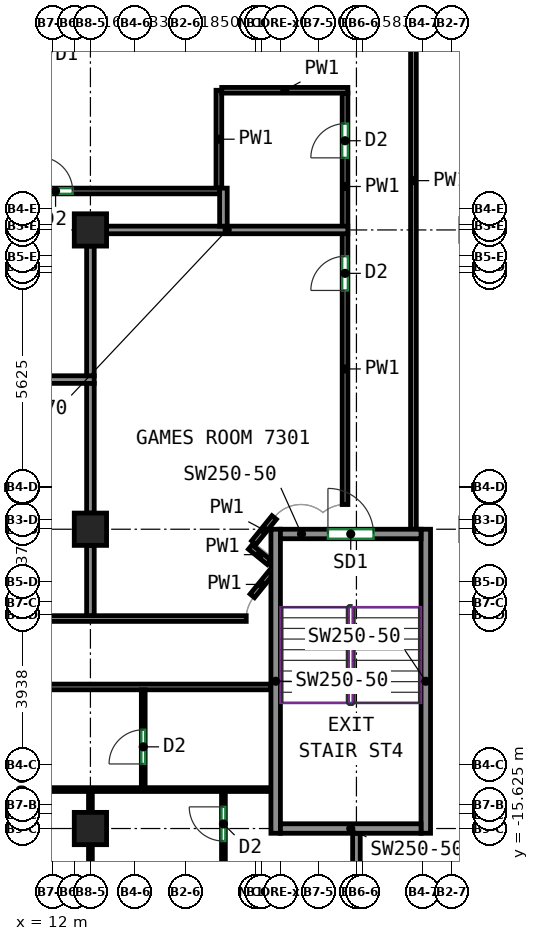
"""IFC4 building model, lengths in metres.
Left out: names, types, materials, properties, quantities, classifications, styles, units other than length and angle.
Written with IfcOpenShell. Run it as: python <this file> out.ifc"""

import sys

from ifc_helpers import new_model, si_unit, direction, frame, frame_2d, origin, origin_2d, place, context, subcontext, project, spatial, rectangle, extrude, source, transform, mapped, element, fill, save


model = new_model("IFC4")
c1 = context("Model", 3, precision=1e-05, world=origin(), true_north=direction((0.0, 1.0)))
c2 = subcontext(c1, "Body", "Model", "MODEL_VIEW")
j1 = project(units=[si_unit("LENGTHUNIT", "METRE"), si_unit("PLANEANGLEUNIT", "RADIAN")], contexts=[c1])
p1 = place(None, origin())
s1 = spatial("IfcSite", under=j1, at=p1, CompositionType="ELEMENT")
p2 = place(p1, origin())
s2 = spatial("IfcBuilding", under=s1, at=p2, CompositionType="ELEMENT")
p3 = place(p2, frame((0.0, 0.0, 295.0)))
s3 = spatial("IfcBuildingStorey", under=s2, at=p3, CompositionType="ELEMENT", Elevation=295.0)
m1 = source(origin(), c2, "Body", "SweptSolid", [
    extrude(rectangle(XDim=0.85, YDim=0.85, at=origin_2d()), origin(), (0.0, 0.0, 1.0), 3.12),
])
for number, where, z_axis, x_axis in (
    (1, (13.0, -15.625, 0.0), (0.0, 0.0, 1.0), (1.0, 0.0, 0.0)),
    (2, (13.0, -7.75, 0.0), (0.0, 0.0, 1.0), (1.0, 0.0, 0.0)),
    (3, (13.0, 0.125, 0.0), (0.0, 0.0, 1.0), (1.0, 0.0, 0.0)),
):
    element("IfcColumn", number, at=place(p3, frame(where, z_axis=z_axis, x_axis=x_axis)), inside=s3, PredefinedType="COLUMN", context=c2, shape_type="MappedRepresentation", body=[
        mapped(m1, transform((0.0, 0.0, 0.0))),
    ])
m2 = source(origin(), c2, "Body", "SweptSolid", [
    extrude(rectangle(XDim=8.0, YDim=0.25, at=frame_2d((4.0, 0.0))), origin(), (0.0, 0.0, 1.0), 3.12),
])
for number, where, z_axis, x_axis in (
    (4, (17.875, -15.75, 0.0), (0.0, 0.0, 1.0), (0.0, 1.0, 0.0)),
    (5, (21.825, -15.75, 0.0), (0.0, 0.0, 1.0), (0.0, 1.0, 0.0)),
):
    element("IfcWall", number, at=place(p3, frame(where, z_axis=z_axis, x_axis=x_axis)), inside=s3, PredefinedType="SHEAR", context=c2, shape_type="MappedRepresentation", body=[
        mapped(m2, transform((0.0, 0.0, 0.0))),
    ])
m3 = source(origin(), c2, "Body", "SweptSolid", [
    extrude(rectangle(XDim=3.7, YDim=0.25, at=frame_2d((1.85, 0.0))), origin(), (0.0, 0.0, 1.0), 3.12),
])
p4 = place(p3, frame((18.0, -15.625, 0.0), z_axis=(0.0, 0.0, 1.0), x_axis=(1.0, 0.0, 0.0)))
e6 = element("IfcWall", 6, at=p4, inside=s3, PredefinedType="SHEAR", context=c2, shape_type="MappedRepresentation", body=[
    mapped(m3, transform((0.0, 0.0, 0.0))),
])
p5 = place(p3, frame((18.0, -7.875, 0.0), z_axis=(0.0, 0.0, 1.0), x_axis=(1.0, 0.0, 0.0)))
e7 = element("IfcWall", 7, at=p5, inside=s3, PredefinedType="SHEAR", context=c2, shape_type="MappedRepresentation", body=[
    mapped(m3, transform((0.0, 0.0, 0.0))),
])
p6 = place(p5, frame((1.25, 0.0, 0.0)))
e8 = element("IfcOpeningElement", 8, at=p6, cuts=e7, PredefinedType="OPENING", context=c2, shape_type="SweptSolid", body=[
    extrude(rectangle(XDim=1.2, YDim=2.1, at=frame_2d((0.6, 1.05))), frame((0.0, 0.135, 0.0), z_axis=(0.0, -1.0, 0.0), x_axis=(1.0, 0.0, 0.0)), (0.0, 0.0, 1.0), 0.27),
])
p7 = place(p3, frame((-13.55, -11.9, 0.0), z_axis=(0.0, 0.0, 1.0), x_axis=(1.0, 0.0, 0.0)))
e9 = element("IfcWall", 9, at=p7, inside=s3, PredefinedType="PARTITIONING", context=c2, shape_type="SweptSolid", body=[
    extrude(rectangle(XDim=31.3, YDim=0.15, at=frame_2d((15.65, 0.0))), origin(), (0.0, 0.0, 1.0), 3.12),
])
p8 = place(p7, frame((3.747, 0.0, 0.0)))
e10 = element("IfcOpeningElement", 10, at=p8, cuts=e9, PredefinedType="OPENING", context=c2, shape_type="SweptSolid", body=[
    extrude(rectangle(XDim=1.0, YDim=2.1, at=frame_2d((0.5, 1.05))), frame((0.0, 0.085, 0.0), z_axis=(0.0, -1.0, 0.0), x_axis=(1.0, 0.0, 0.0)), (0.0, 0.0, 1.0), 0.17),
])
p9 = place(p7, frame((22.835, 0.0, 0.0)))
e11 = element("IfcOpeningElement", 11, at=p9, cuts=e9, PredefinedType="OPENING", context=c2, shape_type="SweptSolid", body=[
    extrude(rectangle(XDim=1.0, YDim=2.1, at=frame_2d((0.5, 1.05))), frame((0.0, 0.085, 0.0), z_axis=(0.0, -1.0, 0.0), x_axis=(1.0, 0.0, 0.0)), (0.0, 0.0, 1.0), 0.17),
])
p10 = place(p3, frame((21.5, -7.75, 0.0), z_axis=(0.0, 0.0, 1.0), x_axis=(0.0, 1.0, 0.0)))
e12 = element("IfcWall", 12, at=p10, inside=s3, PredefinedType="PARTITIONING", context=c2, shape_type="SweptSolid", body=[
    extrude(rectangle(XDim=30.575, YDim=0.15, at=frame_2d((15.288, 0.0))), origin(), (0.0, 0.0, 1.0), 3.12),
])
p11 = place(p10, frame((14.035, 0.0, 0.0)))
e13 = element("IfcOpeningElement", 13, at=p11, cuts=e12, PredefinedType="OPENING", context=c2, shape_type="SweptSolid", body=[
    extrude(rectangle(XDim=0.9, YDim=2.1, at=frame_2d((0.45, 1.05))), frame((0.0, 0.085, 0.0), z_axis=(0.0, -1.0, 0.0), x_axis=(1.0, 0.0, 0.0)), (0.0, 0.0, 1.0), 0.17),
])
p12 = place(p3, frame((-13.55, -10.1, 0.0), z_axis=(0.0, 0.0, 1.0), x_axis=(1.0, 0.0, 0.0)))
e14 = element("IfcWall", 14, at=p12, inside=s3, PredefinedType="PARTITIONING", context=c2, shape_type="SweptSolid", body=[
    extrude(rectangle(XDim=30.65, YDim=0.15, at=frame_2d((15.325, 0.0))), origin(), (0.0, 0.0, 1.0), 3.12),
])
p13 = place(p12, frame((10.25, 0.0, 0.0)))
e15 = element("IfcOpeningElement", 15, at=p13, cuts=e14, PredefinedType="OPENING", context=c2, shape_type="SweptSolid", body=[
    extrude(rectangle(XDim=0.9, YDim=2.1, at=frame_2d((0.45, 1.05))), frame((0.0, 0.085, 0.0), z_axis=(0.0, -1.0, 0.0), x_axis=(1.0, 0.0, 0.0)), (0.0, 0.0, 1.0), 0.17),
])
p14 = place(p12, frame((22.153, 0.0, 0.0)))
e16 = element("IfcOpeningElement", 16, at=p14, cuts=e14, PredefinedType="OPENING", context=c2, shape_type="SweptSolid", body=[
    extrude(rectangle(XDim=0.9, YDim=2.1, at=frame_2d((0.45, 1.05))), frame((0.0, 0.085, 0.0), z_axis=(0.0, -1.0, 0.0), x_axis=(1.0, 0.0, 0.0)), (0.0, 0.0, 1.0), 0.17),
])
p15 = place(p3, frame((16.38, 1.225, 0.0), z_axis=(0.0, 0.0, 1.0), x_axis=(0.0, 1.0, 0.0)))
e17 = element("IfcWall", 17, at=p15, inside=s3, PredefinedType="PARTITIONING", context=c2, shape_type="SweptSolid", body=[
    extrude(rectangle(XDim=2.575, YDim=0.15, at=frame_2d((1.288, 0.0))), origin(), (0.0, 0.0, 1.0), 3.12),
])
p16 = place(p3, frame((6.805, 1.15, 0.0), z_axis=(0.0, 0.0, 1.0), x_axis=(1.0, 0.0, 0.0)))
e18 = element("IfcWall", 18, at=p16, inside=s3, PredefinedType="PARTITIONING", context=c2, shape_type="SweptSolid", body=[
    extrude(rectangle(XDim=9.595, YDim=0.15, at=frame_2d((4.797, 0.0))), origin(), (0.0, 0.0, 1.0), 3.12),
])
p17 = place(p16, frame((4.828, 0.0, 0.0)))
e19 = element("IfcOpeningElement", 19, at=p17, cuts=e18, PredefinedType="OPENING", context=c2, shape_type="SweptSolid", body=[
    extrude(rectangle(XDim=0.9, YDim=2.1, at=frame_2d((0.45, 1.05))), frame((0.0, 0.085, 0.0), z_axis=(0.0, -1.0, 0.0), x_axis=(1.0, 0.0, 0.0)), (0.0, 0.0, 1.0), 0.17),
])
p18 = place(p3, frame((17.748, -8.902, 0.0), z_axis=(0.0, 0.0, 1.0), x_axis=(-0.630342797145, -0.776316918589, 0.0)))
e20 = element("IfcWall", 20, at=p18, inside=s3, PredefinedType="PARTITIONING", context=c2, shape_type="SweptSolid", body=[
    extrude(rectangle(XDim=0.773, YDim=0.15, at=frame_2d((0.386, 0.0))), origin(), (0.0, 0.0, 1.0), 3.12),
])
p19 = place(p3, frame((17.206, -8.218, 0.0), z_axis=(0.0, 0.0, 1.0), x_axis=(0.776102288291, -0.630607039376, 0.0)))
e21 = element("IfcWall", 21, at=p19, inside=s3, PredefinedType="PARTITIONING", context=c2, shape_type="SweptSolid", body=[
    extrude(rectangle(XDim=0.638, YDim=0.15, at=frame_2d((0.319, 0.0))), origin(), (0.0, 0.0, 1.0), 3.12),
])
p20 = place(p3, frame((17.835, -7.442, 0.0), z_axis=(0.0, 0.0, 1.0), x_axis=(-0.628859024249, -0.777519342281, 0.0)))
e22 = element("IfcWall", 22, at=p20, inside=s3, PredefinedType="PARTITIONING", context=c2, shape_type="SweptSolid", body=[
    extrude(rectangle(XDim=0.849, YDim=0.15, at=frame_2d((0.425, 0.0))), origin(), (0.0, 0.0, 1.0), 3.12),
])
p21 = place(p3, frame((19.7, -7.1, 0.0), z_axis=(0.0, 0.0, 1.0), x_axis=(0.0, 1.0, 0.0)))
e23 = element("IfcWall", 23, at=p21, inside=s3, PredefinedType="PARTITIONING", context=c2, shape_type="SweptSolid", body=[
    extrude(rectangle(XDim=7.135, YDim=0.15, at=frame_2d((3.567, 0.0))), origin(), (0.0, 0.0, 1.0), 3.12),
])
p22 = place(p21, frame((5.633, 0.0, 0.0)))
e24 = element("IfcOpeningElement", 24, at=p22, cuts=e23, PredefinedType="OPENING", context=c2, shape_type="SweptSolid", body=[
    extrude(rectangle(XDim=0.9, YDim=2.1, at=frame_2d((0.45, 1.05))), frame((0.0, 0.085, 0.0), z_axis=(0.0, -1.0, 0.0), x_axis=(1.0, 0.0, 0.0)), (0.0, 0.0, 1.0), 0.17),
])
p23 = place(p3, frame((19.7, 0.215, 0.0), z_axis=(0.0, 0.0, 1.0), x_axis=(0.0, 1.0, 0.0)))
e25 = element("IfcWall", 25, at=p23, inside=s3, PredefinedType="PARTITIONING", context=c2, shape_type="SweptSolid", body=[
    extrude(rectangle(XDim=3.51, YDim=0.15, at=frame_2d((1.755, 0.0))), origin(), (0.0, 0.0, 1.0), 3.12),
])
p24 = place(p23, frame((1.807, 0.0, 0.0)))
e26 = element("IfcOpeningElement", 26, at=p24, cuts=e25, PredefinedType="OPENING", context=c2, shape_type="SweptSolid", body=[
    extrude(rectangle(XDim=0.9, YDim=2.1, at=frame_2d((0.45, 1.05))), frame((0.0, 0.085, 0.0), z_axis=(0.0, -1.0, 0.0), x_axis=(1.0, 0.0, 0.0)), (0.0, 0.0, 1.0), 0.17),
])
p25 = place(p3, frame((16.455, 3.8, 0.0), z_axis=(0.0, 0.0, 1.0), x_axis=(1.0, 0.0, 0.0)))
e27 = element("IfcWall", 27, at=p25, inside=s3, PredefinedType="PARTITIONING", context=c2, shape_type="SweptSolid", body=[
    extrude(rectangle(XDim=3.32, YDim=0.15, at=frame_2d((1.66, 0.0))), origin(), (0.0, 0.0, 1.0), 3.12),
])
p26 = place(p3, frame((-13.55, -14.6, 0.0), z_axis=(0.0, 0.0, 1.0), x_axis=(1.0, 0.0, 0.0)))
e28 = element("IfcWall", 28, at=p26, inside=s3, PredefinedType="PARTITIONING", context=c2, shape_type="SweptSolid", body=[
    extrude(rectangle(XDim=31.3, YDim=0.1, at=frame_2d((15.65, 0.0))), origin(), (0.0, 0.0, 1.0), 3.12),
])
p27 = place(p26, frame((0.309, 0.0, 0.0)))
e29 = element("IfcOpeningElement", 29, at=p27, cuts=e28, PredefinedType="OPENING", context=c2, shape_type="SweptSolid", body=[
    extrude(rectangle(XDim=0.9, YDim=2.1, at=frame_2d((0.45, 1.05))), frame((0.0, 0.06, 0.0), z_axis=(0.0, -1.0, 0.0), x_axis=(1.0, 0.0, 0.0)), (0.0, 0.0, 1.0), 0.12),
])
p28 = place(p26, frame((4.103, 0.0, 0.0)))
e30 = element("IfcOpeningElement", 30, at=p28, cuts=e28, PredefinedType="OPENING", context=c2, shape_type="SweptSolid", body=[
    extrude(rectangle(XDim=1.0, YDim=2.1, at=frame_2d((0.5, 1.05))), frame((0.0, 0.06, 0.0), z_axis=(0.0, -1.0, 0.0), x_axis=(1.0, 0.0, 0.0)), (0.0, 0.0, 1.0), 0.12),
])
p29 = place(p26, frame((13.955, 0.0, 0.0)))
e31 = element("IfcOpeningElement", 31, at=p29, cuts=e28, PredefinedType="OPENING", context=c2, shape_type="SweptSolid", body=[
    extrude(rectangle(XDim=0.9, YDim=2.1, at=frame_2d((0.45, 1.05))), frame((0.0, 0.06, 0.0), z_axis=(0.0, -1.0, 0.0), x_axis=(1.0, 0.0, 0.0)), (0.0, 0.0, 1.0), 0.12),
])
p30 = place(p26, frame((17.453, 0.0, 0.0)))
e32 = element("IfcOpeningElement", 32, at=p30, cuts=e28, PredefinedType="OPENING", context=c2, shape_type="SweptSolid", body=[
    extrude(rectangle(XDim=1.0, YDim=2.1, at=frame_2d((0.5, 1.05))), frame((0.0, 0.06, 0.0), z_axis=(0.0, -1.0, 0.0), x_axis=(1.0, 0.0, 0.0)), (0.0, 0.0, 1.0), 0.12),
])
p31 = place(p26, frame((23.13, 0.0, 0.0)))
e33 = element("IfcOpeningElement", 33, at=p31, cuts=e28, PredefinedType="OPENING", context=c2, shape_type="SweptSolid", body=[
    extrude(rectangle(XDim=1.0, YDim=2.1, at=frame_2d((0.5, 1.05))), frame((0.0, 0.06, 0.0), z_axis=(0.0, -1.0, 0.0), x_axis=(1.0, 0.0, 0.0)), (0.0, 0.0, 1.0), 0.12),
])
p32 = place(p3, frame((14.39, -14.55, 0.0), z_axis=(0.0, 0.0, 1.0), x_axis=(0.0, 1.0, 0.0)))
e34 = element("IfcWall", 34, at=p32, inside=s3, PredefinedType="PARTITIONING", context=c2, shape_type="SweptSolid", body=[
    extrude(rectangle(XDim=2.573, YDim=0.1, at=frame_2d((1.287, 0.0))), origin(), (0.0, 0.0, 1.0), 3.12),
])
p33 = place(p32, frame((0.624, 0.0, 0.0)))
e35 = element("IfcOpeningElement", 35, at=p33, cuts=e34, PredefinedType="OPENING", context=c2, shape_type="SweptSolid", body=[
    extrude(rectangle(XDim=0.9, YDim=2.1, at=frame_2d((0.45, 1.05))), frame((0.0, 0.06, 0.0), z_axis=(0.0, -1.0, 0.0), x_axis=(1.0, 0.0, 0.0)), (0.0, 0.0, 1.0), 0.12),
])
p34 = place(p3, frame((13.0, -15.2, 0.0), z_axis=(0.0, 0.0, 1.0), x_axis=(0.0, 1.0, 0.0)))
e36 = element("IfcWall", 36, at=p34, inside=s3, PredefinedType="PARTITIONING", context=c2, shape_type="SweptSolid", body=[
    extrude(rectangle(XDim=0.548, YDim=0.1, at=frame_2d((0.274, 0.0))), origin(), (0.0, 0.0, 1.0), 3.12),
])
p35 = place(p3, frame((13.0, -22.75, 0.0), z_axis=(0.0, 0.0, 1.0), x_axis=(0.0, 1.0, 0.0)))
e37 = element("IfcWall", 37, at=p35, inside=s3, PredefinedType="PARTITIONING", context=c2, shape_type="SweptSolid", body=[
    extrude(rectangle(XDim=6.7, YDim=0.1, at=frame_2d((3.35, 0.0))), origin(), (0.0, 0.0, 1.0), 3.12),
])
p36 = place(p35, frame((4.377, 0.0, 0.0)))
e38 = element("IfcOpeningElement", 38, at=p36, cuts=e37, PredefinedType="OPENING", context=c2, shape_type="SweptSolid", body=[
    extrude(rectangle(XDim=0.9, YDim=2.1, at=frame_2d((0.45, 1.05))), frame((0.0, 0.06, 0.0), z_axis=(0.0, -1.0, 0.0), x_axis=(1.0, 0.0, 0.0)), (0.0, 0.0, 1.0), 0.12),
])
p37 = place(p3, frame((16.5, -19.91, 0.0), z_axis=(0.0, 0.0, 1.0), x_axis=(0.0, 1.0, 0.0)))
e39 = element("IfcWall", 39, at=p37, inside=s3, PredefinedType="PARTITIONING", context=c2, shape_type="SweptSolid", body=[
    extrude(rectangle(XDim=5.258, YDim=0.1, at=frame_2d((2.629, 0.0))), origin(), (0.0, 0.0, 1.0), 3.12),
])
p38 = place(p37, frame((3.955, 0.0, 0.0)))
e40 = element("IfcOpeningElement", 40, at=p38, cuts=e39, PredefinedType="OPENING", context=c2, shape_type="SweptSolid", body=[
    extrude(rectangle(XDim=0.9, YDim=2.1, at=frame_2d((0.45, 1.05))), frame((0.0, 0.06, 0.0), z_axis=(0.0, -1.0, 0.0), x_axis=(1.0, 0.0, 0.0)), (0.0, 0.0, 1.0), 0.12),
])
p39 = place(p3, frame((20.0, -19.9, 0.0), z_axis=(0.0, 0.0, 1.0), x_axis=(0.0, 1.0, 0.0)))
e41 = element("IfcWall", 41, at=p39, inside=s3, PredefinedType="PARTITIONING", context=c2, shape_type="SweptSolid", body=[
    extrude(rectangle(XDim=4.15, YDim=0.2, at=frame_2d((2.075, 0.0))), origin(), (0.0, 0.0, 1.0), 3.12),
])
p40 = place(p3, frame((-4.6, -3.812, 0.0), z_axis=(0.0, 0.0, 1.0), x_axis=(1.0, 0.0, 0.0)))
e42 = element("IfcWall", 42, at=p40, inside=s3, PredefinedType="PARTITIONING", context=c2, shape_type="SweptSolid", body=[
    extrude(rectangle(XDim=17.7, YDim=0.2, at=frame_2d((8.85, 0.0))), origin(), (0.0, 0.0, 1.0), 3.12),
])
p41 = place(p3, frame((13.0, -7.325, 0.0), z_axis=(0.0, 0.0, 1.0), x_axis=(0.0, 1.0, 0.0)))
e43 = element("IfcWall", 43, at=p41, inside=s3, PredefinedType="PARTITIONING", context=c2, shape_type="SweptSolid", body=[
    extrude(rectangle(XDim=3.413, YDim=0.2, at=frame_2d((1.707, 0.0))), origin(), (0.0, 0.0, 1.0), 3.12),
])
p42 = place(p3, frame((13.0, -10.023, 0.0), z_axis=(0.0, 0.0, 1.0), x_axis=(0.0, 1.0, 0.0)))
e44 = element("IfcWall", 44, at=p42, inside=s3, PredefinedType="PARTITIONING", context=c2, shape_type="SweptSolid", body=[
    extrude(rectangle(XDim=1.848, YDim=0.2, at=frame_2d((0.924, 0.0))), origin(), (0.0, 0.0, 1.0), 3.12),
])
p43 = place(p3, frame((13.425, 0.125, 0.0), z_axis=(0.0, 0.0, 1.0), x_axis=(1.0, 0.0, 0.0)))
e45 = element("IfcWall", 45, at=p43, inside=s3, PredefinedType="PARTITIONING", context=c2, shape_type="SweptSolid", body=[
    extrude(rectangle(XDim=6.348, YDim=0.2, at=frame_2d((3.174, 0.0))), origin(), (0.0, 0.0, 1.0), 2.57),
])
p44 = place(p3, frame((13.0, -3.712, 0.0), z_axis=(0.0, 0.0, 1.0), x_axis=(0.0, 1.0, 0.0)))
e46 = element("IfcWall", 46, at=p44, inside=s3, PredefinedType="PARTITIONING", context=c2, shape_type="SweptSolid", body=[
    extrude(rectangle(XDim=3.412, YDim=0.2, at=frame_2d((1.706, 0.0))), origin(), (0.0, 0.0, 1.0), 3.12),
])
p45 = place(p3, frame((16.5, 0.225, 0.0), z_axis=(0.0, 0.0, 1.0), x_axis=(0.0, 1.0, 0.0)))
e47 = element("IfcWall", 47, at=p45, inside=s3, PredefinedType="PARTITIONING", context=c2, shape_type="SweptSolid", body=[
    extrude(rectangle(XDim=1.0, YDim=0.2, at=frame_2d((0.5, 0.0))), origin(), (0.0, 0.0, 1.0), 3.12),
])
p46 = place(p6, origin())
e48 = element("IfcDoor", 48, at=p46, inside=s3, OperationType="DOUBLE_DOOR_SINGLE_SWING", PredefinedType="DOOR", context=c2, shape_type="SweptSolid", body=[
    extrude(rectangle(XDim=1.2, YDim=2.1, at=frame_2d((0.6, 1.05))), frame((0.0, 0.025, 0.0), z_axis=(0.0, -1.0, 0.0), x_axis=(1.0, 0.0, 0.0)), (0.0, 0.0, 1.0), 0.05),
])
fill(e8, e48)
p47 = place(p38, origin())
e49 = element("IfcDoor", 49, at=p47, inside=s3, OperationType="SINGLE_SWING_RIGHT", PredefinedType="DOOR", context=c2, shape_type="SweptSolid", body=[
    extrude(rectangle(XDim=0.9, YDim=2.1, at=frame_2d((0.45, 1.05))), frame((0.0, 0.025, 0.0), z_axis=(0.0, -1.0, 0.0), x_axis=(1.0, 0.0, 0.0)), (0.0, 0.0, 1.0), 0.05),
])
fill(e40, e49)
p48 = place(p33, origin())
e50 = element("IfcDoor", 50, at=p48, inside=s3, OperationType="SINGLE_SWING_LEFT", PredefinedType="DOOR", context=c2, shape_type="SweptSolid", body=[
    extrude(rectangle(XDim=0.9, YDim=2.1, at=frame_2d((0.45, 1.05))), frame((0.0, 0.025, 0.0), z_axis=(0.0, -1.0, 0.0), x_axis=(1.0, 0.0, 0.0)), (0.0, 0.0, 1.0), 0.05),
])
fill(e35, e50)
p49 = place(p22, origin())
e51 = element("IfcDoor", 51, at=p49, inside=s3, OperationType="SINGLE_SWING_LEFT", PredefinedType="DOOR", context=c2, shape_type="SweptSolid", body=[
    extrude(rectangle(XDim=0.9, YDim=2.1, at=frame_2d((0.45, 1.05))), frame((0.0, 0.025, 0.0), z_axis=(0.0, -1.0, 0.0), x_axis=(1.0, 0.0, 0.0)), (0.0, 0.0, 1.0), 0.05),
])
fill(e24, e51)
p50 = place(p17, origin())
e52 = element("IfcDoor", 52, at=p50, inside=s3, OperationType="SINGLE_SWING_LEFT", PredefinedType="DOOR", context=c2, shape_type="SweptSolid", body=[
    extrude(rectangle(XDim=0.9, YDim=2.1, at=frame_2d((0.45, 1.05))), frame((0.0, 0.025, 0.0), z_axis=(0.0, -1.0, 0.0), x_axis=(1.0, 0.0, 0.0)), (0.0, 0.0, 1.0), 0.05),
])
fill(e19, e52)
p51 = place(p24, origin())
e53 = element("IfcDoor", 53, at=p51, inside=s3, OperationType="SINGLE_SWING_LEFT", PredefinedType="DOOR", context=c2, shape_type="SweptSolid", body=[
    extrude(rectangle(XDim=0.9, YDim=2.1, at=frame_2d((0.45, 1.05))), frame((0.0, 0.025, 0.0), z_axis=(0.0, -1.0, 0.0), x_axis=(1.0, 0.0, 0.0)), (0.0, 0.0, 1.0), 0.05),
])
fill(e26, e53)
save(model, sys.argv[1])
